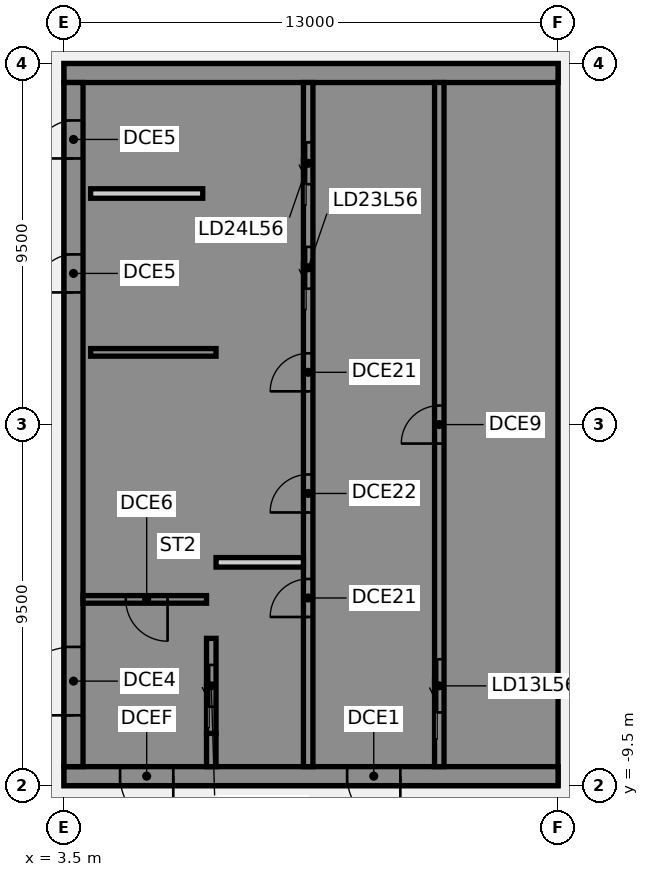
"""IFC4 building model, lengths in metres.
Left out: names, types, materials, properties, quantities, classifications, styles, units other than length and angle.
Written with IfcOpenShell. Run it as: python <this file> out.ifc"""

import sys

from ifc_helpers import new_model, si_unit, direction, frame, frame_2d, origin, place, context, subcontext, project, spatial, polyline, rectangle, outline, extrude, element, fill, save


model = new_model("IFC4")
c1 = context("Model", 3, precision=1e-05, world=origin(), true_north=direction((0.0, 1.0)))
c2 = subcontext(c1, "Body", "Model", "MODEL_VIEW")
j1 = project(units=[si_unit("LENGTHUNIT", "METRE"), si_unit("PLANEANGLEUNIT", "RADIAN")], contexts=[c1])
p1 = place(None, origin())
s1 = spatial("IfcSite", under=j1, at=p1, CompositionType="ELEMENT")
p2 = place(p1, origin())
s2 = spatial("IfcBuilding", under=s1, at=p2, CompositionType="ELEMENT")
p3 = place(p2, frame((0.0, 0.0, 223.5)))
s3 = spatial("IfcBuildingStorey", under=s2, at=p3, CompositionType="ELEMENT", Elevation=223.5)
p4 = place(p3, frame((16.5, -9.25, 0.0), z_axis=(0.0, 0.0, 1.0), x_axis=(-1.0, 0.0, 0.0)))
e1 = element("IfcWall", 1, at=p4, inside=s3, PredefinedType="SHEAR", context=c2, shape_type="SweptSolid", body=[
    extrude(rectangle(XDim=13.0, YDim=0.5, at=frame_2d((6.5, 0.0))), origin(), (0.0, 0.0, 1.0), 3.46),
])
p5 = place(p4, frame((4.15, 0.0, 0.0)))
e2 = element("IfcOpeningElement", 2, at=p5, cuts=e1, PredefinedType="OPENING", context=c2, shape_type="SweptSolid", body=[
    extrude(rectangle(XDim=1.4, YDim=2.1, at=frame_2d((0.7, 1.05))), frame((0.0, 0.26, 0.0), z_axis=(0.0, -1.0, 0.0), x_axis=(1.0, 0.0, 0.0)), (0.0, 0.0, 1.0), 0.52),
])
p6 = place(p4, frame((10.125, 0.0, 0.0)))
e3 = element("IfcOpeningElement", 3, at=p6, cuts=e1, PredefinedType="OPENING", context=c2, shape_type="SweptSolid", body=[
    extrude(rectangle(XDim=1.4, YDim=2.1, at=frame_2d((0.7, 1.05))), frame((0.0, 0.26, 0.0), z_axis=(0.0, -1.0, 0.0), x_axis=(1.0, 0.0, 0.0)), (0.0, 0.0, 1.0), 0.52),
])
p7 = place(p3, origin())
e4 = element("IfcWall", 4, at=p7, inside=s3, PredefinedType="SHEAR", context=c2, shape_type="SweptSolid", body=[
    extrude(outline(polyline([(13.5, -8.125), (13.5, -9.0), (16.0, -9.0), (16.5, -9.0), (16.5, 9.0), (16.0, 9.0), (13.5, 9.0), (13.5, 8.125), (16.0, 8.125), (16.0, 5.625), (13.5, 5.625), (13.5, 5.375), (16.0, 5.375), (16.0, -5.375), (13.5, -5.375), (13.5, -5.625), (16.0, -5.625), (16.0, -8.125), (13.5, -8.125)])), origin(), (0.0, 0.0, 1.0), 3.46),
])
p8 = place(p3, frame((16.5, 9.25, 0.0), z_axis=(0.0, 0.0, 1.0), x_axis=(-1.0, 0.0, 0.0)))
e5 = element("IfcWall", 5, at=p8, inside=s3, PredefinedType="SHEAR", context=c2, shape_type="SweptSolid", body=[
    extrude(rectangle(XDim=13.0, YDim=0.5, at=frame_2d((6.5, 0.0))), origin(), (0.0, 0.0, 1.0), 3.46),
])
p9 = place(p3, origin())
e6 = element("IfcWall", 6, at=p9, inside=s3, PredefinedType="SHEAR", context=c2, shape_type="SweptSolid", body=[
    extrude(outline(polyline([(9.8, -5.375), (7.5, -5.375), (7.5, 2.625), (9.8, 2.625), (9.8, 2.875), (7.5, 2.875), (7.5, 5.375), (9.8, 5.375), (9.8, 5.625), (7.5, 5.625), (7.5, 8.125), (9.8, 8.125), (9.8, 9.0), (7.5, 9.0), (7.25, 9.0), (7.25, -5.625), (7.5, -5.625), (9.8, -5.625), (9.8, -5.375)])), origin(), (0.0, 0.0, 1.0), 3.46),
])
p10 = place(p3, origin())
e7 = element("IfcWall", 7, at=p10, inside=s3, PredefinedType="SHEAR", context=c2, shape_type="SweptSolid", body=[
    extrude(outline(polyline([(7.5, -8.125), (7.5, -9.0), (9.8, -9.0), (9.8, -8.125), (9.8, -5.625), (9.55, -5.625), (9.55, -8.125), (7.5, -8.125)])), origin(), (0.0, 0.0, 1.0), 3.46),
])
p11 = place(p3, frame((7.375, -9.0, 0.0), z_axis=(0.0, 0.0, 1.0), x_axis=(0.0, 1.0, 0.0)))
e8 = element("IfcWall", 8, at=p11, inside=s3, PredefinedType="SHEAR", context=c2, shape_type="SweptSolid", body=[
    extrude(rectangle(XDim=0.875, YDim=0.25, at=frame_2d((0.438, 0.0))), origin(), (0.0, 0.0, 1.0), 3.46),
])
p12 = place(p3, frame((7.5, 1.9, 0.0), z_axis=(0.0, 0.0, 1.0), x_axis=(-1.0, 0.0, 0.0)))
e9 = element("IfcWall", 9, at=p12, inside=s3, PredefinedType="SHEAR", context=c2, shape_type="SweptSolid", body=[
    extrude(rectangle(XDim=3.3, YDim=0.2, at=frame_2d((1.65, 0.0))), origin(), (0.0, 0.0, 1.0), 3.46),
])
p13 = place(p3, frame((13.375, -9.0, 0.0), z_axis=(0.0, 0.0, 1.0), x_axis=(0.0, 1.0, 0.0)))
e10 = element("IfcWall", 10, at=p13, inside=s3, PredefinedType="SHEAR", context=c2, shape_type="SweptSolid", body=[
    extrude(rectangle(XDim=18.0, YDim=0.25, at=frame_2d((9.0, 0.0))), origin(), (0.0, 0.0, 1.0), 3.46),
])
p14 = place(p13, frame((1.425, 0.0, 0.0)))
e11 = element("IfcOpeningElement", 11, at=p14, cuts=e10, PredefinedType="OPENING", context=c2, shape_type="SweptSolid", body=[
    extrude(rectangle(XDim=1.4, YDim=2.1, at=frame_2d((0.7, 1.05))), frame((0.0, 0.135, 0.0), z_axis=(0.0, -1.0, 0.0), x_axis=(1.0, 0.0, 0.0)), (0.0, 0.0, 1.0), 0.27),
])
p15 = place(p13, frame((8.5, 0.0, 0.0)))
e12 = element("IfcOpeningElement", 12, at=p15, cuts=e10, PredefinedType="OPENING", context=c2, shape_type="SweptSolid", body=[
    extrude(rectangle(XDim=1.0, YDim=2.1, at=frame_2d((0.5, 1.05))), frame((0.0, 0.135, 0.0), z_axis=(0.0, -1.0, 0.0), x_axis=(1.0, 0.0, 0.0)), (0.0, 0.0, 1.0), 0.27),
])
p16 = place(p3, frame((9.925, -9.0, 0.0), z_axis=(0.0, 0.0, 1.0), x_axis=(0.0, 1.0, 0.0)))
e13 = element("IfcWall", 13, at=p16, inside=s3, PredefinedType="SHEAR", context=c2, shape_type="SweptSolid", body=[
    extrude(rectangle(XDim=18.0, YDim=0.25, at=frame_2d((9.0, 0.0))), origin(), (0.0, 0.0, 1.0), 3.46),
])
p17 = place(p16, frame((12.575, 0.0, 0.0)))
e14 = element("IfcOpeningElement", 14, at=p17, cuts=e13, PredefinedType="OPENING", context=c2, shape_type="SweptSolid", body=[
    extrude(rectangle(XDim=1.1, YDim=2.1, at=frame_2d((0.55, 1.05))), frame((0.0, 0.135, 0.0), z_axis=(0.0, -1.0, 0.0), x_axis=(1.0, 0.0, 0.0)), (0.0, 0.0, 1.0), 0.27),
])
p18 = place(p16, frame((15.325, 0.0, 0.0)))
e15 = element("IfcOpeningElement", 15, at=p18, cuts=e13, PredefinedType="OPENING", context=c2, shape_type="SweptSolid", body=[
    extrude(rectangle(XDim=1.1, YDim=2.1, at=frame_2d((0.55, 1.05))), frame((0.0, 0.135, 0.0), z_axis=(0.0, -1.0, 0.0), x_axis=(1.0, 0.0, 0.0)), (0.0, 0.0, 1.0), 0.27),
])
p19 = place(p16, frame((3.938, 0.0, 0.0)))
e16 = element("IfcOpeningElement", 16, at=p19, cuts=e13, PredefinedType="OPENING", context=c2, shape_type="SweptSolid", body=[
    extrude(rectangle(XDim=1.0, YDim=2.1, at=frame_2d((0.5, 1.05))), frame((0.0, 0.135, 0.0), z_axis=(0.0, -1.0, 0.0), x_axis=(1.0, 0.0, 0.0)), (0.0, 0.0, 1.0), 0.27),
])
p20 = place(p16, frame((6.688, 0.0, 0.0)))
e17 = element("IfcOpeningElement", 17, at=p20, cuts=e13, PredefinedType="OPENING", context=c2, shape_type="SweptSolid", body=[
    extrude(rectangle(XDim=1.0, YDim=2.1, at=frame_2d((0.5, 1.05))), frame((0.0, 0.135, 0.0), z_axis=(0.0, -1.0, 0.0), x_axis=(1.0, 0.0, 0.0)), (0.0, 0.0, 1.0), 0.27),
])
p21 = place(p16, frame((9.875, 0.0, 0.0)))
e18 = element("IfcOpeningElement", 18, at=p21, cuts=e13, PredefinedType="OPENING", context=c2, shape_type="SweptSolid", body=[
    extrude(rectangle(XDim=1.0, YDim=2.1, at=frame_2d((0.5, 1.05))), frame((0.0, 0.135, 0.0), z_axis=(0.0, -1.0, 0.0), x_axis=(1.0, 0.0, 0.0)), (0.0, 0.0, 1.0), 0.27),
])
p22 = place(p3, frame((7.375, -8.125, 0.0), z_axis=(0.0, 0.0, 1.0), x_axis=(0.0, 1.0, 0.0)))
e19 = element("IfcWall", 19, at=p22, inside=s3, PredefinedType="SHEAR", context=c2, shape_type="SweptSolid", body=[
    extrude(rectangle(XDim=2.5, YDim=0.25, at=frame_2d((1.25, 0.0))), origin(), (0.0, 0.0, 1.0), 3.46),
])
p23 = place(p22, frame((0.7, 0.0, 0.0)))
e20 = element("IfcOpeningElement", 20, at=p23, cuts=e19, PredefinedType="OPENING", context=c2, shape_type="SweptSolid", body=[
    extrude(rectangle(XDim=1.1, YDim=2.1, at=frame_2d((0.55, 1.05))), frame((0.0, 0.135, 0.0), z_axis=(0.0, -1.0, 0.0), x_axis=(1.0, 0.0, 0.0)), (0.0, 0.0, 1.0), 0.27),
])
p24 = place(p3, frame((3.75, -9.0, 0.0), z_axis=(0.0, 0.0, 1.0), x_axis=(0.0, 1.0, 0.0)))
e21 = element("IfcWall", 21, at=p24, inside=s3, PredefinedType="SHEAR", context=c2, shape_type="SweptSolid", body=[
    extrude(rectangle(XDim=18.0, YDim=0.5, at=frame_2d((9.0, 0.0))), origin(), (0.0, 0.0, 1.0), 3.46),
])
p25 = place(p24, frame((1.35, 0.0, 0.0)))
e22 = element("IfcOpeningElement", 22, at=p25, cuts=e21, PredefinedType="OPENING", context=c2, shape_type="SweptSolid", body=[
    extrude(rectangle(XDim=1.8, YDim=2.1, at=frame_2d((0.9, 1.05))), frame((0.0, 0.26, 0.0), z_axis=(0.0, -1.0, 0.0), x_axis=(1.0, 0.0, 0.0)), (0.0, 0.0, 1.0), 0.52),
])
p26 = place(p24, frame((12.478, 0.0, 0.0)))
e23 = element("IfcOpeningElement", 23, at=p26, cuts=e21, PredefinedType="OPENING", context=c2, shape_type="SweptSolid", body=[
    extrude(rectangle(XDim=1.0, YDim=2.1, at=frame_2d((0.5, 1.05))), frame((0.0, 0.26, 0.0), z_axis=(0.0, -1.0, 0.0), x_axis=(1.0, 0.0, 0.0)), (0.0, 0.0, 1.0), 0.52),
])
p27 = place(p24, frame((16.002, 0.0, 0.0)))
e24 = element("IfcOpeningElement", 24, at=p27, cuts=e21, PredefinedType="OPENING", context=c2, shape_type="SweptSolid", body=[
    extrude(rectangle(XDim=1.0, YDim=2.1, at=frame_2d((0.5, 1.05))), frame((0.0, 0.26, 0.0), z_axis=(0.0, -1.0, 0.0), x_axis=(1.0, 0.0, 0.0)), (0.0, 0.0, 1.0), 0.52),
])
p28 = place(p3, frame((7.15, 6.08, 0.0), z_axis=(0.0, 0.0, 1.0), x_axis=(-1.0, 0.0, 0.0)))
e25 = element("IfcWall", 25, at=p28, inside=s3, PredefinedType="PARTITIONING", context=c2, shape_type="SweptSolid", body=[
    extrude(rectangle(XDim=2.95, YDim=0.25, at=frame_2d((1.475, 0.0))), origin(), (0.0, 0.0, 1.0), 3.46),
])
p29 = place(p3, frame((7.25, -4.6, 0.0), z_axis=(0.0, 0.0, 1.0), x_axis=(-1.0, 0.0, 0.0)))
e26 = element("IfcWall", 26, at=p29, inside=s3, PredefinedType="SHEAR", context=c2, shape_type="SweptSolid", body=[
    extrude(rectangle(XDim=3.25, YDim=0.2, at=frame_2d((1.625, 0.0))), origin(), (0.0, 0.0, 1.0), 3.46),
])
p30 = place(p29, frame((1.025, 0.0, 0.0)))
e27 = element("IfcOpeningElement", 27, at=p30, cuts=e26, PredefinedType="OPENING", context=c2, shape_type="SweptSolid", body=[
    extrude(rectangle(XDim=1.1, YDim=2.1, at=frame_2d((0.55, 1.05))), frame((0.0, 0.11, 0.0), z_axis=(0.0, -1.0, 0.0), x_axis=(1.0, 0.0, 0.0)), (0.0, 0.0, 1.0), 0.22),
])
p31 = place(p3, frame((9.8, -3.625, 0.0), z_axis=(0.0, 0.0, 1.0), x_axis=(-1.0, 0.0, 0.0)))
e28 = element("IfcWall", 28, at=p31, inside=s3, PredefinedType="PARTITIONING", context=c2, shape_type="SweptSolid", body=[
    extrude(rectangle(XDim=2.3, YDim=0.25, at=frame_2d((1.15, 0.0))), origin(), (0.0, 0.0, 1.0), 3.46),
])
p32 = place(p5, origin())
e29 = element("IfcDoor", 29, at=p32, inside=s3, OperationType="SINGLE_SWING_LEFT", PredefinedType="DOOR", context=c2, shape_type="SweptSolid", body=[
    extrude(rectangle(XDim=1.4, YDim=2.1, at=frame_2d((0.7, 1.05))), frame((0.0, 0.025, 0.0), z_axis=(0.0, -1.0, 0.0), x_axis=(1.0, 0.0, 0.0)), (0.0, 0.0, 1.0), 0.05),
])
fill(e2, e29)
p33 = place(p6, origin())
e30 = element("IfcDoor", 30, at=p33, inside=s3, OperationType="SINGLE_SWING_LEFT", PredefinedType="DOOR", context=c2, shape_type="SweptSolid", body=[
    extrude(rectangle(XDim=1.4, YDim=2.1, at=frame_2d((0.7, 1.05))), frame((0.0, 0.025, 0.0), z_axis=(0.0, -1.0, 0.0), x_axis=(1.0, 0.0, 0.0)), (0.0, 0.0, 1.0), 0.05),
])
fill(e3, e30)
p34 = place(p25, origin())
e31 = element("IfcDoor", 31, at=p34, inside=s3, OperationType="SINGLE_SWING_LEFT", PredefinedType="DOOR", context=c2, shape_type="SweptSolid", body=[
    extrude(rectangle(XDim=1.8, YDim=2.1, at=frame_2d((0.9, 1.05))), frame((0.0, 0.025, 0.0), z_axis=(0.0, -1.0, 0.0), x_axis=(1.0, 0.0, 0.0)), (0.0, 0.0, 1.0), 0.05),
])
fill(e22, e31)
p35 = place(p26, origin())
e32 = element("IfcDoor", 32, at=p35, inside=s3, OperationType="SINGLE_SWING_LEFT", PredefinedType="DOOR", context=c2, shape_type="SweptSolid", body=[
    extrude(rectangle(XDim=1.0, YDim=2.1, at=frame_2d((0.5, 1.05))), frame((0.0, -0.175, 0.0), z_axis=(0.0, -1.0, 0.0), x_axis=(1.0, 0.0, 0.0)), (0.0, 0.0, 1.0), 0.05),
])
fill(e23, e32)
p36 = place(p27, origin())
e33 = element("IfcDoor", 33, at=p36, inside=s3, OperationType="SINGLE_SWING_LEFT", PredefinedType="DOOR", context=c2, shape_type="SweptSolid", body=[
    extrude(rectangle(XDim=1.0, YDim=2.1, at=frame_2d((0.5, 1.05))), frame((0.0, -0.175, 0.0), z_axis=(0.0, -1.0, 0.0), x_axis=(1.0, 0.0, 0.0)), (0.0, 0.0, 1.0), 0.05),
])
fill(e24, e33)
p37 = place(p30, origin())
e34 = element("IfcDoor", 34, at=p37, inside=s3, OperationType="SINGLE_SWING_LEFT", PredefinedType="DOOR", context=c2, shape_type="SweptSolid", body=[
    extrude(rectangle(XDim=1.1, YDim=2.1, at=frame_2d((0.55, 1.05))), frame((0.0, 0.025, 0.0), z_axis=(0.0, -1.0, 0.0), x_axis=(1.0, 0.0, 0.0)), (0.0, 0.0, 1.0), 0.05),
])
fill(e27, e34)
p38 = place(p14, origin())
e35 = element("IfcDoor", 35, at=p38, inside=s3, OperationType="SLIDING_TO_LEFT", PredefinedType="DOOR", context=c2, shape_type="SweptSolid", body=[
    extrude(rectangle(XDim=1.4, YDim=2.1, at=frame_2d((0.7, 1.05))), frame((0.0, 0.025, 0.0), z_axis=(0.0, -1.0, 0.0), x_axis=(1.0, 0.0, 0.0)), (0.0, 0.0, 1.0), 0.05),
])
fill(e11, e35)
p39 = place(p23, origin())
e36 = element("IfcDoor", 36, at=p39, inside=s3, OperationType="SLIDING_TO_LEFT", PredefinedType="DOOR", context=c2, shape_type="SweptSolid", body=[
    extrude(rectangle(XDim=1.1, YDim=2.1, at=frame_2d((0.55, 1.05))), frame((0.0, 0.025, 0.0), z_axis=(0.0, -1.0, 0.0), x_axis=(1.0, 0.0, 0.0)), (0.0, 0.0, 1.0), 0.05),
])
fill(e20, e36)
p40 = place(p17, origin())
e37 = element("IfcDoor", 37, at=p40, inside=s3, OperationType="SLIDING_TO_LEFT", PredefinedType="DOOR", context=c2, shape_type="SweptSolid", body=[
    extrude(rectangle(XDim=1.1, YDim=2.1, at=frame_2d((0.55, 1.05))), frame((0.0, 0.025, 0.0), z_axis=(0.0, -1.0, 0.0), x_axis=(1.0, 0.0, 0.0)), (0.0, 0.0, 1.0), 0.05),
])
fill(e14, e37)
p41 = place(p18, origin())
e38 = element("IfcDoor", 38, at=p41, inside=s3, OperationType="SLIDING_TO_LEFT", PredefinedType="DOOR", context=c2, shape_type="SweptSolid", body=[
    extrude(rectangle(XDim=1.1, YDim=2.1, at=frame_2d((0.55, 1.05))), frame((0.0, 0.025, 0.0), z_axis=(0.0, -1.0, 0.0), x_axis=(1.0, 0.0, 0.0)), (0.0, 0.0, 1.0), 0.05),
])
fill(e15, e38)
p42 = place(p15, origin())
e39 = element("IfcDoor", 39, at=p42, inside=s3, OperationType="SINGLE_SWING_LEFT", PredefinedType="DOOR", context=c2, shape_type="SweptSolid", body=[
    extrude(rectangle(XDim=1.0, YDim=2.1, at=frame_2d((0.5, 1.05))), frame((0.0, 0.025, 0.0), z_axis=(0.0, -1.0, 0.0), x_axis=(1.0, 0.0, 0.0)), (0.0, 0.0, 1.0), 0.05),
])
fill(e12, e39)
p43 = place(p19, origin())
e40 = element("IfcDoor", 40, at=p43, inside=s3, OperationType="SINGLE_SWING_LEFT", PredefinedType="DOOR", context=c2, shape_type="SweptSolid", body=[
    extrude(rectangle(XDim=1.0, YDim=2.1, at=frame_2d((0.5, 1.05))), frame((0.0, 0.025, 0.0), z_axis=(0.0, -1.0, 0.0), x_axis=(1.0, 0.0, 0.0)), (0.0, 0.0, 1.0), 0.05),
])
fill(e16, e40)
p44 = place(p20, origin())
e41 = element("IfcDoor", 41, at=p44, inside=s3, OperationType="SINGLE_SWING_LEFT", PredefinedType="DOOR", context=c2, shape_type="SweptSolid", body=[
    extrude(rectangle(XDim=1.0, YDim=2.1, at=frame_2d((0.5, 1.05))), frame((0.0, 0.025, 0.0), z_axis=(0.0, -1.0, 0.0), x_axis=(1.0, 0.0, 0.0)), (0.0, 0.0, 1.0), 0.05),
])
fill(e17, e41)
p45 = place(p21, origin())
e42 = element("IfcDoor", 42, at=p45, inside=s3, OperationType="SINGLE_SWING_LEFT", PredefinedType="DOOR", context=c2, shape_type="SweptSolid", body=[
    extrude(rectangle(XDim=1.0, YDim=2.1, at=frame_2d((0.5, 1.05))), frame((0.0, 0.025, 0.0), z_axis=(0.0, -1.0, 0.0), x_axis=(1.0, 0.0, 0.0)), (0.0, 0.0, 1.0), 0.05),
])
fill(e18, e42)
save(model, sys.argv[1])
